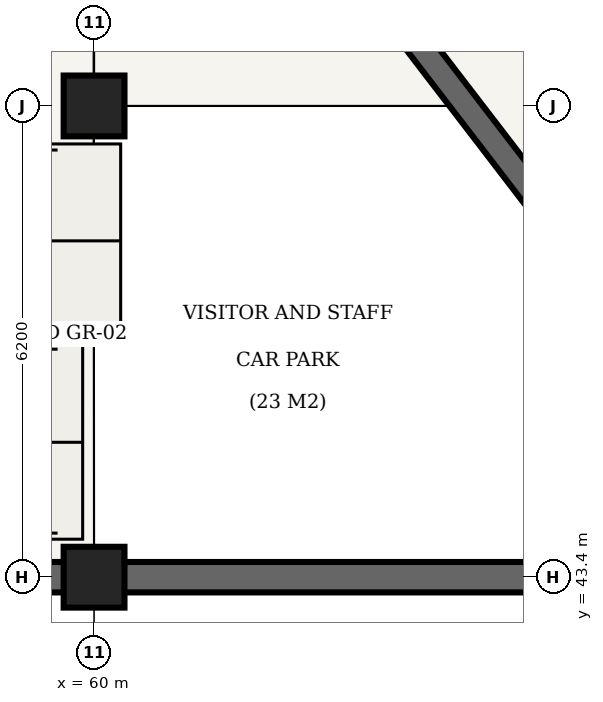
"""IFC4 building model, lengths in metres.
Left out: names, types, materials, properties, quantities, classifications, styles, units other than length and angle.
Written with IfcOpenShell. Run it as: python <this file> out.ifc"""

import sys

from ifc_helpers import new_model, si_unit, direction, frame, frame_2d, origin, origin_2d, place, context, subcontext, project, spatial, rectangle, extrude, element, save


model = new_model("IFC4")
c1 = context("Model", 3, precision=1e-05, world=origin(), true_north=direction((0.0, 1.0)))
c2 = subcontext(c1, "Body", "Model", "MODEL_VIEW")
j1 = project(units=[si_unit("LENGTHUNIT", "METRE"), si_unit("PLANEANGLEUNIT", "RADIAN")], contexts=[c1])
p1 = place(None, origin())
s1 = spatial("IfcSite", under=j1, at=p1, CompositionType="ELEMENT")
p2 = place(p1, origin())
s2 = spatial("IfcBuilding", under=s1, at=p2, CompositionType="ELEMENT")
p3 = place(p2, frame((0.0, 0.0, -5.4)))
s3 = spatial("IfcBuildingStorey", under=s2, at=p3, CompositionType="ELEMENT", Elevation=-5.4)
for number, where, z_axis, x_axis in (
    (1, (60.0, 43.4, -0.4), (0.0, 0.0, 1.0), (1.0, 0.0, 0.0)),
    (2, (60.0, 49.6, -0.4), (0.0, 0.0, 1.0), (1.0, 0.0, 0.0)),
):
    element("IfcColumn", number, at=place(p3, frame(where, z_axis=z_axis, x_axis=x_axis)), inside=s3, PredefinedType="COLUMN", context=c2, shape_type="SweptSolid", body=[
        extrude(rectangle(XDim=0.8, YDim=0.8, at=origin_2d()), origin(), (0.0, 0.0, 1.0), 5.8),
    ])
p4 = place(p3, frame((63.247, 51.75, -0.4), z_axis=(0.0, 0.0, 1.0), x_axis=(0.60876670321, -0.793349293227, 0.0)))
e3 = element("IfcWall", 3, at=p4, inside=s3, PredefinedType="SHEAR", context=c2, shape_type="SweptSolid", body=[
    extrude(rectangle(XDim=5.352, YDim=0.35, at=frame_2d((2.676, 0.0))), origin(), (0.0, 0.0, 1.0), 5.5),
])
p5 = place(p3, frame((72.794, 43.4, -0.4), z_axis=(0.0, 0.0, 1.0), x_axis=(-1.0, 0.0, 0.0)))
e4 = element("IfcWall", 4, at=p5, inside=s3, PredefinedType="USERDEFINED", context=c2, shape_type="SweptSolid", body=[
    extrude(rectangle(XDim=36.794, YDim=0.4, at=frame_2d((18.397, 0.0))), origin(), (0.0, 0.0, 1.0), 5.5),
])
save(model, sys.argv[1])
